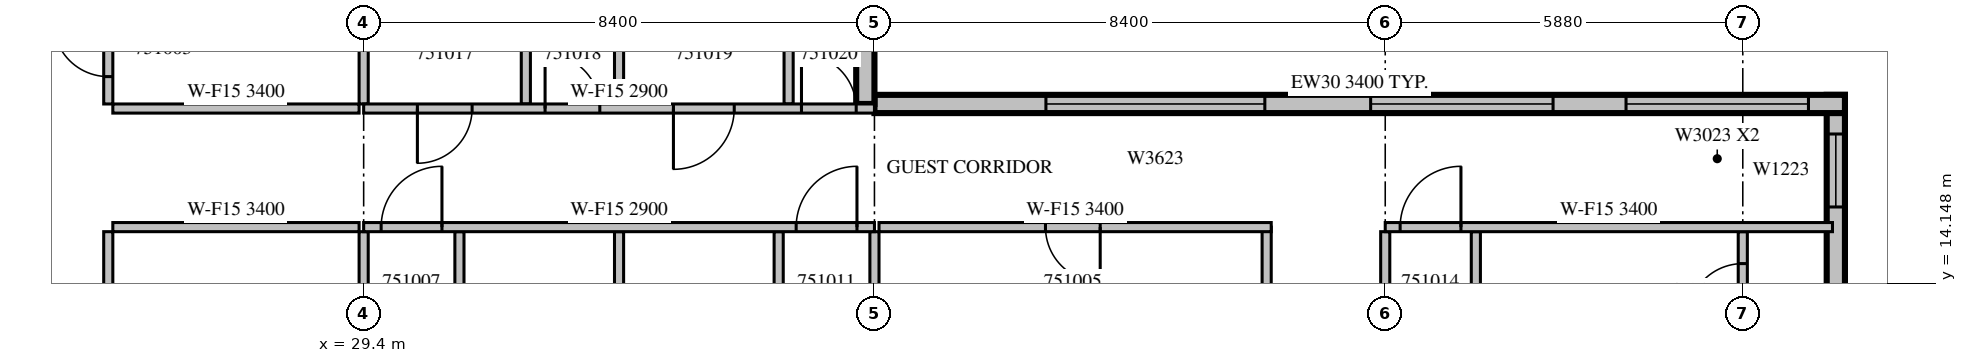
"""IFC4 building model, lengths in metres.
Left out: names, types, materials, properties, quantities, classifications, styles, units other than length and angle.
Written with IfcOpenShell. Run it as: python <this file> out.ifc"""

import sys

from ifc_helpers import new_model, si_unit, direction, frame, frame_2d, origin, place, context, subcontext, project, spatial, rectangle, extrude, source, transform, mapped, element, fill, save


model = new_model("IFC4")
c1 = context("Model", 3, precision=1e-05, world=origin(), true_north=direction((0.0, 1.0)))
c2 = subcontext(c1, "Body", "Model", "MODEL_VIEW")
j1 = project(units=[si_unit("LENGTHUNIT", "METRE"), si_unit("PLANEANGLEUNIT", "RADIAN")], contexts=[c1])
p1 = place(None, origin())
s1 = spatial("IfcSite", under=j1, at=p1, CompositionType="ELEMENT")
p2 = place(p1, origin())
s2 = spatial("IfcBuilding", under=s1, at=p2, CompositionType="ELEMENT")
p3 = place(p2, frame((0.0, 0.0, 227.2)))
s3 = spatial("IfcBuildingStorey", under=s2, at=p3, CompositionType="ELEMENT", Elevation=227.2)
m1 = source(origin(), c2, "Body", "SweptSolid", [
    extrude(rectangle(XDim=3.375, YDim=0.3, at=frame_2d((1.688, 0.0))), origin(), (0.0, 0.0, 1.0), 3.4),
])
p4 = place(p3, frame((53.61, 13.875, 0.0), z_axis=(0.0, 0.0, 1.0), x_axis=(0.0, 1.0, 0.0)))
e1 = element("IfcWall", 1, at=p4, inside=s3, PredefinedType="STANDARD", context=c2, shape_type="MappedRepresentation", body=[
    mapped(m1, transform((0.0, 0.0, 0.0), scale=1.0)),
])
m2 = source(origin(), c2, "Body", "SweptSolid", [
    extrude(rectangle(XDim=1.2, YDim=2.3, at=frame_2d((0.6, 1.15))), frame((0.0, 0.16, 0.0), z_axis=(0.0, -1.0, 0.0), x_axis=(1.0, 0.0, 0.0)), (0.0, 0.0, 1.0), 0.32),
])
p5 = place(p4, frame((1.531, 0.0, 0.6)))
e2 = element("IfcOpeningElement", 2, at=p5, cuts=e1, PredefinedType="OPENING", context=c2, shape_type="MappedRepresentation", body=[
    mapped(m2, transform((0.0, 0.0, 0.0), scale=1.0)),
])
m3 = source(origin(), c2, "Body", "SweptSolid", [
    extrude(rectangle(XDim=15.96, YDim=0.3, at=frame_2d((7.98, 0.0))), origin(), (0.0, 0.0, 1.0), 3.4),
])
p6 = place(p3, frame((53.76, 17.1, 0.0), z_axis=(0.0, 0.0, 1.0), x_axis=(-1.0, 0.0, 0.0)))
e3 = element("IfcWall", 3, at=p6, inside=s3, PredefinedType="STANDARD", context=c2, shape_type="MappedRepresentation", body=[
    mapped(m3, transform((0.0, 0.0, 0.0), scale=1.0)),
])
m4 = source(origin(), c2, "Body", "SweptSolid", [
    extrude(rectangle(XDim=3.0, YDim=2.3, at=frame_2d((1.5, 1.15))), frame((0.0, 0.16, 0.0), z_axis=(0.0, -1.0, 0.0), x_axis=(1.0, 0.0, 0.0)), (0.0, 0.0, 1.0), 0.32),
])
p7 = place(p6, frame((0.6, 0.0, 0.6)))
e4 = element("IfcOpeningElement", 4, at=p7, cuts=e3, PredefinedType="OPENING", context=c2, shape_type="MappedRepresentation", body=[
    mapped(m4, transform((0.0, 0.0, 0.0), scale=1.0)),
])
p8 = place(p6, frame((4.8, 0.0, 0.6)))
e5 = element("IfcOpeningElement", 5, at=p8, cuts=e3, PredefinedType="OPENING", context=c2, shape_type="MappedRepresentation", body=[
    mapped(m4, transform((0.0, 0.0, 0.0), scale=1.0)),
])
m5 = source(origin(), c2, "Body", "SweptSolid", [
    extrude(rectangle(XDim=3.6, YDim=2.3, at=frame_2d((1.8, 1.15))), frame((0.0, 0.16, 0.0), z_axis=(0.0, -1.0, 0.0), x_axis=(1.0, 0.0, 0.0)), (0.0, 0.0, 1.0), 0.32),
])
p9 = place(p6, frame((9.54, 0.0, 0.6)))
e6 = element("IfcOpeningElement", 6, at=p9, cuts=e3, PredefinedType="OPENING", context=c2, shape_type="MappedRepresentation", body=[
    mapped(m5, transform((0.0, 0.0, 0.0), scale=1.0)),
])
p10 = place(p3, frame((37.65, 17.1, 0.0), z_axis=(0.0, 0.0, 1.0), x_axis=(0.0, 1.0, 0.0)))
e7 = element("IfcWall", 7, at=p10, inside=s3, PredefinedType="STANDARD", context=c2, shape_type="SweptSolid", body=[
    extrude(rectangle(XDim=3.1, YDim=0.3, at=frame_2d((1.55, 0.0))), origin(), (0.0, 0.0, 1.0), 3.4),
])
m6 = source(origin(), c2, "Body", "SweptSolid", [
    extrude(rectangle(XDim=1.8, YDim=2.3, at=frame_2d((0.9, 1.15))), frame((0.0, 0.16, 0.0), z_axis=(0.0, -1.0, 0.0), x_axis=(1.0, 0.0, 0.0)), (0.0, 0.0, 1.0), 0.32),
])
p11 = place(p10, frame((1.125, 0.0, 0.6)))
e8 = element("IfcOpeningElement", 8, at=p11, cuts=e7, PredefinedType="OPENING", context=c2, shape_type="MappedRepresentation", body=[
    mapped(m6, transform((0.0, 0.0, 0.0), scale=1.0)),
])
m7 = source(origin(), c2, "Body", "SweptSolid", [
    extrude(rectangle(XDim=11.525, YDim=0.15, at=frame_2d((5.763, 0.0))), origin(), (0.0, 0.0, 1.0), 2.4),
])
p12 = place(p3, frame((25.2, 15.0, 0.0), z_axis=(0.0, 0.0, 1.0), x_axis=(0.0, -1.0, 0.0)))
e9 = element("IfcWall", 9, at=p12, inside=s3, PredefinedType="PARTITIONING", context=c2, shape_type="MappedRepresentation", body=[
    mapped(m7, transform((0.0, 0.0, 0.0), scale=1.0)),
])
m8 = source(origin(), c2, "Body", "SweptSolid", [
    extrude(rectangle(XDim=0.9, YDim=2.1, at=frame_2d((0.45, 1.05))), frame((0.0, 0.085, 0.0), z_axis=(0.0, -1.0, 0.0), x_axis=(1.0, 0.0, 0.0)), (0.0, 0.0, 1.0), 0.17),
])
p13 = place(p12, frame((7.562, 0.0, 0.0)))
e10 = element("IfcOpeningElement", 10, at=p13, cuts=e9, PredefinedType="OPENING", context=c2, shape_type="MappedRepresentation", body=[
    mapped(m8, transform((0.0, 0.0, 0.0), scale=1.0)),
])
p14 = place(p12, frame((0.925, 0.0, 0.0)))
e11 = element("IfcOpeningElement", 11, at=p14, cuts=e9, PredefinedType="OPENING", context=c2, shape_type="MappedRepresentation", body=[
    mapped(m8, transform((0.0, 0.0, 0.0), scale=1.0)),
])
m9 = source(origin(), c2, "Body", "SweptSolid", [
    extrude(rectangle(XDim=3.6, YDim=0.15, at=frame_2d((1.8, 0.0))), origin(), (0.0, 0.0, 1.0), 3.4),
])
p15 = place(p3, frame((25.2, 20.7, 0.0), z_axis=(0.0, 0.0, 1.0), x_axis=(0.0, -1.0, 0.0)))
e12 = element("IfcWall", 12, at=p15, inside=s3, PredefinedType="PARTITIONING", context=c2, shape_type="MappedRepresentation", body=[
    mapped(m9, transform((0.0, 0.0, 0.0), scale=1.0)),
])
p16 = place(p15, frame((2.25, 0.0, 0.0)))
e13 = element("IfcOpeningElement", 13, at=p16, cuts=e12, PredefinedType="OPENING", context=c2, shape_type="MappedRepresentation", body=[
    mapped(m8, transform((0.0, 0.0, 0.0), scale=1.0)),
])
m10 = source(origin(), c2, "Body", "SweptSolid", [
    extrude(rectangle(XDim=4.05, YDim=0.15, at=frame_2d((2.025, 0.0))), origin(), (0.0, 0.0, 1.0), 3.4),
])
for number, where, z_axis, x_axis in (
    (14, (29.325, 15.075, 0.0), (0.0, 0.0, 1.0), (-1.0, 0.0, 0.0)),
    (15, (25.275, 17.025, 0.0), (0.0, 0.0, 1.0), (1.0, 0.0, 0.0)),
):
    element("IfcWall", number, at=place(p3, frame(where, z_axis=z_axis, x_axis=x_axis)), inside=s3, PredefinedType="PARTITIONING", context=c2, shape_type="MappedRepresentation", body=[
        mapped(m10, transform((0.0, 0.0, 0.0), scale=1.0)),
    ])
p17 = place(p3, frame((29.4, 10.899, 0.0), z_axis=(0.0, 0.0, 1.0), x_axis=(0.0, 1.0, 0.0)))
e16 = element("IfcWall", 16, at=p17, inside=s3, PredefinedType="PARTITIONING", context=c2, shape_type="SweptSolid", body=[
    extrude(rectangle(XDim=4.101, YDim=0.15, at=frame_2d((2.05, 0.0))), origin(), (0.0, 0.0, 1.0), 3.4),
])
p18 = place(p3, frame((29.4, 17.1, 0.0), z_axis=(0.0, 0.0, 1.0), x_axis=(0.0, 1.0, 0.0)))
e17 = element("IfcWall", 17, at=p18, inside=s3, PredefinedType="PARTITIONING", context=c2, shape_type="SweptSolid", body=[
    extrude(rectangle(XDim=3.101, YDim=0.15, at=frame_2d((1.55, 0.0))), origin(), (0.0, 0.0, 1.0), 3.4),
])
m11 = source(origin(), c2, "Body", "SweptSolid", [
    extrude(rectangle(XDim=3.175, YDim=0.15, at=frame_2d((1.587, 0.0))), origin(), (0.0, 0.0, 1.0), 3.4),
])
p19 = place(p3, frame((44.25, 11.9, 0.0), z_axis=(0.0, 0.0, 1.0), x_axis=(0.0, 1.0, 0.0)))
e18 = element("IfcWall", 18, at=p19, inside=s3, PredefinedType="PARTITIONING", context=c2, shape_type="MappedRepresentation", body=[
    mapped(m11, transform((0.0, 0.0, 0.0), scale=1.0)),
])
m12 = source(origin(), c2, "Body", "SweptSolid", [
    extrude(rectangle(XDim=6.45, YDim=0.15, at=frame_2d((3.225, 0.0))), origin(), (0.0, 0.0, 1.0), 3.4),
])
p20 = place(p3, frame((44.325, 15.075, 0.0), z_axis=(0.0, 0.0, 1.0), x_axis=(-1.0, 0.0, 0.0)))
e19 = element("IfcWall", 19, at=p20, inside=s3, PredefinedType="PARTITIONING", context=c2, shape_type="MappedRepresentation", body=[
    mapped(m12, transform((0.0, 0.0, 0.0), scale=1.0)),
])
p21 = place(p20, frame((2.812, 0.0, 0.0)))
e20 = element("IfcOpeningElement", 20, at=p21, cuts=e19, PredefinedType="OPENING", context=c2, shape_type="MappedRepresentation", body=[
    mapped(m8, transform((0.0, 0.0, 0.0), scale=1.0)),
])
p22 = place(p3, frame((30.975, 11.05, 0.0), z_axis=(0.0, 0.0, 1.0), x_axis=(0.0, 1.0, 0.0)))
e21 = element("IfcWall", 21, at=p22, inside=s3, PredefinedType="PARTITIONING", context=c2, shape_type="SweptSolid", body=[
    extrude(rectangle(XDim=3.95, YDim=0.15, at=frame_2d((1.975, 0.0))), origin(), (0.0, 0.0, 1.0), 3.4),
])
p23 = place(p3, frame((33.6, 11.05, 0.0), z_axis=(0.0, 0.0, 1.0), x_axis=(0.0, 1.0, 0.0)))
e22 = element("IfcWall", 22, at=p23, inside=s3, PredefinedType="PARTITIONING", context=c2, shape_type="SweptSolid", body=[
    extrude(rectangle(XDim=3.95, YDim=0.15, at=frame_2d((1.975, 0.0))), origin(), (0.0, 0.0, 1.0), 2.9),
])
m13 = source(origin(), c2, "Body", "SweptSolid", [
    extrude(rectangle(XDim=3.95, YDim=0.15, at=frame_2d((1.975, 0.0))), origin(), (0.0, 0.0, 1.0), 3.4),
])
for number, where, z_axis, x_axis in (
    (23, (36.225, 11.05, 0.0), (0.0, 0.0, 1.0), (0.0, 1.0, 0.0)),
    (24, (37.8, 11.05, 0.0), (0.0, 0.0, 1.0), (0.0, 1.0, 0.0)),
    (25, (47.69, 11.05, 0.0), (0.0, 0.0, 1.0), (0.0, 1.0, 0.0)),
):
    element("IfcWall", number, at=place(p3, frame(where, z_axis=z_axis, x_axis=x_axis)), inside=s3, PredefinedType="PARTITIONING", context=c2, shape_type="MappedRepresentation", body=[
        mapped(m13, transform((0.0, 0.0, 0.0), scale=1.0)),
    ])
p24 = place(p3, frame((52.08, 11.05, 0.0), z_axis=(0.0, 0.0, 1.0), x_axis=(0.0, 1.0, 0.0)))
e26 = element("IfcWall", 26, at=p24, inside=s3, PredefinedType="PARTITIONING", context=c2, shape_type="MappedRepresentation", body=[
    mapped(m13, transform((0.0, 0.0, 0.0), scale=1.0)),
])
p25 = place(p24, frame((1.525, 0.0, 0.0)))
e27 = element("IfcOpeningElement", 27, at=p25, cuts=e26, PredefinedType="OPENING", context=c2, shape_type="MappedRepresentation", body=[
    mapped(m8, transform((0.0, 0.0, 0.0), scale=1.0)),
])
p26 = place(p24, frame((2.525, 0.0, 0.0)))
e28 = element("IfcOpeningElement", 28, at=p26, cuts=e26, PredefinedType="OPENING", context=c2, shape_type="MappedRepresentation", body=[
    mapped(m8, transform((0.0, 0.0, 0.0), scale=1.0)),
])
p27 = place(p24, frame((0.525, 0.0, 0.0)))
e29 = element("IfcOpeningElement", 29, at=p27, cuts=e26, PredefinedType="OPENING", context=c2, shape_type="MappedRepresentation", body=[
    mapped(m8, transform((0.0, 0.0, 0.0), scale=1.0)),
])
p28 = place(p3, frame((46.2, 11.05, 0.0), z_axis=(0.0, 0.0, 1.0), x_axis=(0.0, 1.0, 0.0)))
e30 = element("IfcWall", 30, at=p28, inside=s3, PredefinedType="PARTITIONING", context=c2, shape_type="MappedRepresentation", body=[
    mapped(m13, transform((0.0, 0.0, 0.0), scale=1.0)),
])
m14 = source(origin(), c2, "Body", "SweptSolid", [
    extrude(rectangle(XDim=3.6, YDim=0.15, at=frame_2d((1.8, 0.0))), origin(), (0.0, 0.0, 1.0), 2.4),
])
for number, where, z_axis, x_axis in (
    (31, (32.067, 20.7, 0.0), (0.0, 0.0, 1.0), (0.0, -1.0, 0.0)),
    (32, (36.389, 20.7, 0.0), (0.0, 0.0, 1.0), (0.0, -1.0, 0.0)),
    (33, (33.6, 17.1, 0.0), (0.0, 0.0, 1.0), (0.0, 1.0, 0.0)),
):
    element("IfcWall", number, at=place(p3, frame(where, z_axis=z_axis, x_axis=x_axis)), inside=s3, PredefinedType="PARTITIONING", context=c2, shape_type="MappedRepresentation", body=[
        mapped(m14, transform((0.0, 0.0, 0.0), scale=1.0)),
    ])
m15 = source(origin(), c2, "Body", "SweptSolid", [
    extrude(rectangle(XDim=8.4, YDim=0.15, at=frame_2d((4.2, 0.0))), origin(), (0.0, 0.0, 1.0), 2.9),
])
p29 = place(p3, frame((37.8, 15.075, 0.0), z_axis=(0.0, 0.0, 1.0), x_axis=(-1.0, 0.0, 0.0)))
e34 = element("IfcWall", 34, at=p29, inside=s3, PredefinedType="PARTITIONING", context=c2, shape_type="MappedRepresentation", body=[
    mapped(m15, transform((0.0, 0.0, 0.0), scale=1.0)),
])
m16 = source(origin(), c2, "Body", "SweptSolid", [
    extrude(rectangle(XDim=1.0, YDim=2.1, at=frame_2d((0.5, 1.05))), frame((0.0, 0.085, 0.0), z_axis=(0.0, -1.0, 0.0), x_axis=(1.0, 0.0, 0.0)), (0.0, 0.0, 1.0), 0.17),
])
p30 = place(p29, frame((7.112, 0.0, 0.0)))
e35 = element("IfcOpeningElement", 35, at=p30, cuts=e34, PredefinedType="OPENING", context=c2, shape_type="MappedRepresentation", body=[
    mapped(m16, transform((0.0, 0.0, 0.0), scale=1.0)),
])
p31 = place(p29, frame((0.287, 0.0, 0.0)))
e36 = element("IfcOpeningElement", 36, at=p31, cuts=e34, PredefinedType="OPENING", context=c2, shape_type="MappedRepresentation", body=[
    mapped(m16, transform((0.0, 0.0, 0.0), scale=1.0)),
])
m17 = source(origin(), c2, "Body", "SweptSolid", [
    extrude(rectangle(XDim=7.355, YDim=0.15, at=frame_2d((3.678, 0.0))), origin(), (0.0, 0.0, 1.0), 3.4),
])
p32 = place(p3, frame((53.555, 15.075, 0.0), z_axis=(0.0, 0.0, 1.0), x_axis=(-1.0, 0.0, 0.0)))
e37 = element("IfcWall", 37, at=p32, inside=s3, PredefinedType="PARTITIONING", context=c2, shape_type="MappedRepresentation", body=[
    mapped(m17, transform((0.0, 0.0, 0.0), scale=1.0)),
])
p33 = place(p32, frame((6.11, 0.0, 0.0)))
e38 = element("IfcOpeningElement", 38, at=p33, cuts=e37, PredefinedType="OPENING", context=c2, shape_type="MappedRepresentation", body=[
    mapped(m16, transform((0.0, 0.0, 0.0), scale=1.0)),
])
p34 = place(p3, frame((29.4, 17.025, 0.0), z_axis=(0.0, 0.0, 1.0), x_axis=(1.0, 0.0, 0.0)))
e39 = element("IfcWall", 39, at=p34, inside=s3, PredefinedType="PARTITIONING", context=c2, shape_type="MappedRepresentation", body=[
    mapped(m15, transform((0.0, 0.0, 0.0), scale=1.0)),
])
p35 = place(p34, frame((0.883, 0.0, 0.0)))
e40 = element("IfcOpeningElement", 40, at=p35, cuts=e39, PredefinedType="OPENING", context=c2, shape_type="MappedRepresentation", body=[
    mapped(m8, transform((0.0, 0.0, 0.0), scale=1.0)),
])
p36 = place(p34, frame((2.983, 0.0, 0.0)))
e41 = element("IfcOpeningElement", 41, at=p36, cuts=e39, PredefinedType="OPENING", context=c2, shape_type="MappedRepresentation", body=[
    mapped(m8, transform((0.0, 0.0, 0.0), scale=1.0)),
])
p37 = place(p34, frame((5.094, 0.0, 0.0)))
e42 = element("IfcOpeningElement", 42, at=p37, cuts=e39, PredefinedType="OPENING", context=c2, shape_type="MappedRepresentation", body=[
    mapped(m16, transform((0.0, 0.0, 0.0), scale=1.0)),
])
p38 = place(p34, frame((7.2, 0.0, 0.0)))
e43 = element("IfcOpeningElement", 43, at=p38, cuts=e39, PredefinedType="OPENING", context=c2, shape_type="MappedRepresentation", body=[
    mapped(m8, transform((0.0, 0.0, 0.0), scale=1.0)),
])
m18 = source(origin(), c2, "Body", "SweptSolid", [
    extrude(rectangle(XDim=1.2, YDim=2.3, at=frame_2d((0.6, 1.15))), frame((0.0, 0.03, 0.0), z_axis=(0.0, -1.0, 0.0), x_axis=(1.0, 0.0, 0.0)), (0.0, 0.0, 1.0), 0.06),
])
p39 = place(p5, origin())
e44 = element("IfcWindow", 44, at=p39, inside=s3, PartitioningType="SINGLE_PANEL", PredefinedType="WINDOW", context=c2, shape_type="MappedRepresentation", body=[
    mapped(m18, transform((0.0, 0.0, 0.0), scale=1.0)),
])
fill(e2, e44)
m19 = source(origin(), c2, "Body", "SweptSolid", [
    extrude(rectangle(XDim=3.0, YDim=2.3, at=frame_2d((1.5, 1.15))), frame((0.0, 0.03, 0.0), z_axis=(0.0, -1.0, 0.0), x_axis=(1.0, 0.0, 0.0)), (0.0, 0.0, 1.0), 0.06),
])
p40 = place(p7, origin())
e45 = element("IfcWindow", 45, at=p40, inside=s3, PartitioningType="SINGLE_PANEL", PredefinedType="WINDOW", context=c2, shape_type="MappedRepresentation", body=[
    mapped(m19, transform((0.0, 0.0, 0.0), scale=1.0)),
])
fill(e4, e45)
p41 = place(p8, origin())
e46 = element("IfcWindow", 46, at=p41, inside=s3, PartitioningType="SINGLE_PANEL", PredefinedType="WINDOW", context=c2, shape_type="MappedRepresentation", body=[
    mapped(m19, transform((0.0, 0.0, 0.0), scale=1.0)),
])
fill(e5, e46)
m20 = source(origin(), c2, "Body", "SweptSolid", [
    extrude(rectangle(XDim=3.6, YDim=2.3, at=frame_2d((1.8, 1.15))), frame((0.0, 0.03, 0.0), z_axis=(0.0, -1.0, 0.0), x_axis=(1.0, 0.0, 0.0)), (0.0, 0.0, 1.0), 0.06),
])
p42 = place(p9, origin())
e47 = element("IfcWindow", 47, at=p42, inside=s3, PartitioningType="SINGLE_PANEL", PredefinedType="WINDOW", context=c2, shape_type="MappedRepresentation", body=[
    mapped(m20, transform((0.0, 0.0, 0.0), scale=1.0)),
])
fill(e6, e47)
m21 = source(origin(), c2, "Body", "SweptSolid", [
    extrude(rectangle(XDim=0.9, YDim=2.1, at=frame_2d((0.45, 1.05))), frame((0.0, 0.025, 0.0), z_axis=(0.0, -1.0, 0.0), x_axis=(1.0, 0.0, 0.0)), (0.0, 0.0, 1.0), 0.05),
])
p43 = place(p16, origin())
e48 = element("IfcDoor", 48, at=p43, inside=s3, OperationType="SINGLE_SWING_RIGHT", PredefinedType="DOOR", context=c2, shape_type="MappedRepresentation", body=[
    mapped(m21, transform((0.0, 0.0, 0.0), scale=1.0)),
])
fill(e13, e48)
p44 = place(p21, origin())
e49 = element("IfcDoor", 49, at=p44, inside=s3, OperationType="SINGLE_SWING_LEFT", PredefinedType="DOOR", context=c2, shape_type="MappedRepresentation", body=[
    mapped(m21, transform((0.0, 0.0, 0.0), scale=1.0)),
])
fill(e20, e49)
m22 = source(origin(), c2, "Body", "SweptSolid", [
    extrude(rectangle(XDim=1.0, YDim=2.1, at=frame_2d((0.5, 1.05))), frame((0.0, 0.025, 0.0), z_axis=(0.0, -1.0, 0.0), x_axis=(1.0, 0.0, 0.0)), (0.0, 0.0, 1.0), 0.05),
])
p45 = place(p30, origin())
e50 = element("IfcDoor", 50, at=p45, inside=s3, OperationType="SINGLE_SWING_RIGHT", PredefinedType="DOOR", context=c2, shape_type="MappedRepresentation", body=[
    mapped(m22, transform((0.0, 0.0, 0.0), scale=1.0)),
])
fill(e35, e50)
p46 = place(p31, origin())
e51 = element("IfcDoor", 51, at=p46, inside=s3, OperationType="SINGLE_SWING_RIGHT", PredefinedType="DOOR", context=c2, shape_type="MappedRepresentation", body=[
    mapped(m22, transform((0.0, 0.0, 0.0), scale=1.0)),
])
fill(e36, e51)
p47 = place(p33, origin())
e52 = element("IfcDoor", 52, at=p47, inside=s3, OperationType="SINGLE_SWING_RIGHT", PredefinedType="DOOR", context=c2, shape_type="MappedRepresentation", body=[
    mapped(m22, transform((0.0, 0.0, 0.0), scale=1.0)),
])
fill(e38, e52)
p48 = place(p35, origin())
e53 = element("IfcDoor", 53, at=p48, inside=s3, OperationType="SINGLE_SWING_RIGHT", PredefinedType="DOOR", context=c2, shape_type="MappedRepresentation", body=[
    mapped(m21, transform((0.0, 0.0, 0.0), scale=1.0)),
])
fill(e40, e53)
p49 = place(p36, origin())
e54 = element("IfcDoor", 54, at=p49, inside=s3, OperationType="SINGLE_SWING_LEFT", PredefinedType="DOOR", context=c2, shape_type="MappedRepresentation", body=[
    mapped(m21, transform((0.0, 0.0, 0.0), scale=1.0)),
])
fill(e41, e54)
p50 = place(p37, origin())
e55 = element("IfcDoor", 55, at=p50, inside=s3, OperationType="SINGLE_SWING_RIGHT", PredefinedType="DOOR", context=c2, shape_type="MappedRepresentation", body=[
    mapped(m22, transform((0.0, 0.0, 0.0), scale=1.0)),
])
fill(e42, e55)
p51 = place(p38, origin())
e56 = element("IfcDoor", 56, at=p51, inside=s3, OperationType="SINGLE_SWING_LEFT", PredefinedType="DOOR", context=c2, shape_type="MappedRepresentation", body=[
    mapped(m21, transform((0.0, 0.0, 0.0), scale=1.0)),
])
fill(e43, e56)
p52 = place(p26, origin())
e57 = element("IfcDoor", 57, at=p52, inside=s3, OperationType="SINGLE_SWING_LEFT", PredefinedType="DOOR", context=c2, shape_type="MappedRepresentation", body=[
    mapped(m21, transform((0.0, 0.0, 0.0), scale=1.0)),
])
fill(e28, e57)
save(model, sys.argv[1])
